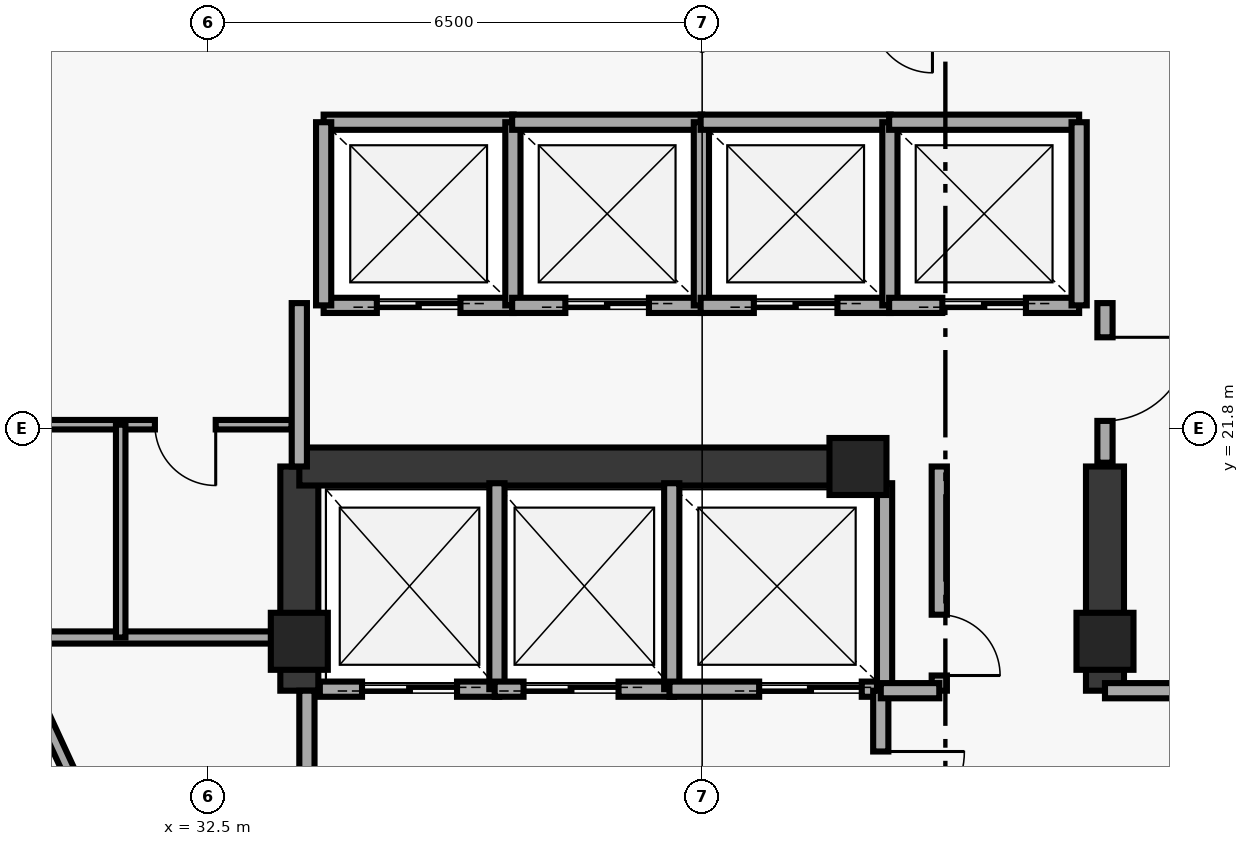
"""IFC4 building model, lengths in metres.
Left out: names, types, materials, properties, quantities, classifications, styles, units other than length and angle.
Written with IfcOpenShell. Run it as: python <this file> out.ifc"""

import sys

from ifc_helpers import new_model, si_unit, direction, frame, frame_2d, origin, origin_2d, place, context, subcontext, project, spatial, rectangle, extrude, element, fill, save


model = new_model("IFC4")
c1 = context("Model", 3, precision=1e-05, world=origin(), true_north=direction((0.0, 1.0)))
c2 = subcontext(c1, "Body", "Model", "MODEL_VIEW")
j1 = project(units=[si_unit("LENGTHUNIT", "METRE"), si_unit("PLANEANGLEUNIT", "RADIAN")], contexts=[c1])
p1 = place(None, origin())
s1 = spatial("IfcSite", under=j1, at=p1, CompositionType="ELEMENT")
p2 = place(p1, origin())
s2 = spatial("IfcBuilding", under=s1, at=p2, CompositionType="ELEMENT")
p3 = place(p2, frame((0.0, 0.0, 297.4)))
s3 = spatial("IfcBuildingStorey", under=s2, at=p3, CompositionType="ELEMENT", Elevation=297.4)
for number, where, z_axis, x_axis in (
    (1, (33.7, 19.0, 0.0), (0.0, 0.0, 1.0), (1.0, 0.0, 0.0)),
    (2, (41.05, 21.3, 0.0), (0.0, 0.0, 1.0), (1.0, 0.0, 0.0)),
    (3, (44.3, 19.0, 0.0), (0.0, 0.0, 1.0), (1.0, 0.0, 0.0)),
):
    element("IfcColumn", number, at=place(p3, frame(where, z_axis=z_axis, x_axis=x_axis)), inside=s3, PredefinedType="PILASTER", context=c2, shape_type="SweptSolid", body=[
        extrude(rectangle(XDim=0.75, YDim=0.75, at=origin_2d()), origin(), (0.0, 0.0, 1.0), 3.45),
    ])
for number, where, z_axis, x_axis in (
    (4, (33.7, 18.35, 0.0), (0.0, 0.0, 1.0), (0.0, 1.0, 0.0)),
    (5, (44.3, 18.35, 0.0), (0.0, 0.0, 1.0), (0.0, 1.0, 0.0)),
):
    element("IfcWall", number, at=place(p3, frame(where, z_axis=z_axis, x_axis=x_axis)), inside=s3, PredefinedType="SHEAR", context=c2, shape_type="SweptSolid", body=[
        extrude(rectangle(XDim=2.95, YDim=0.5, at=frame_2d((1.475, 0.0))), origin(), (0.0, 0.0, 1.0), 3.45),
    ])
p4 = place(p3, frame((33.7, 21.3, 0.0), z_axis=(0.0, 0.0, 1.0), x_axis=(1.0, 0.0, 0.0)))
e6 = element("IfcWall", 6, at=p4, inside=s3, PredefinedType="SHEAR", context=c2, shape_type="SweptSolid", body=[
    extrude(rectangle(XDim=7.55, YDim=0.5, at=frame_2d((3.775, 0.0))), origin(), (0.0, 0.0, 1.0), 3.45),
])
p5 = place(p3, frame((34.02, 23.42, 0.0), z_axis=(0.0, 0.0, 1.0), x_axis=(1.0, 0.0, 0.0)))
e7 = element("IfcWall", 7, at=p5, inside=s3, PredefinedType="SOLIDWALL", context=c2, shape_type="SweptSolid", body=[
    extrude(rectangle(XDim=2.5, YDim=0.2, at=frame_2d((1.25, 0.0))), origin(), (0.0, 0.0, 1.0), 3.45),
])
p6 = place(p5, frame((0.7, 0.0, 0.0)))
e8 = element("IfcOpeningElement", 8, at=p6, cuts=e7, PredefinedType="OPENING", context=c2, shape_type="SweptSolid", body=[
    extrude(rectangle(XDim=1.1, YDim=2.15, at=frame_2d((0.55, 1.075))), frame((0.0, 0.11, 0.0), z_axis=(0.0, -1.0, 0.0), x_axis=(1.0, 0.0, 0.0)), (0.0, 0.0, 1.0), 0.22),
])
p7 = place(p3, frame((34.02, 25.83, 0.0), z_axis=(0.0, 0.0, 1.0), x_axis=(1.0, 0.0, 0.0)))
e9 = element("IfcWall", 9, at=p7, inside=s3, PredefinedType="SOLIDWALL", context=c2, shape_type="SweptSolid", body=[
    extrude(rectangle(XDim=2.5, YDim=0.2, at=frame_2d((1.25, 0.0))), origin(), (0.0, 0.0, 1.0), 3.45),
])
for number, where, z_axis, x_axis in (
    (10, (34.02, 23.42, 0.0), (0.0, 0.0, 1.0), (0.0, 1.0, 0.0)),
    (11, (36.51, 23.42, 0.0), (0.0, 0.0, 1.0), (0.0, 1.0, 0.0)),
):
    element("IfcWall", number, at=place(p3, frame(where, z_axis=z_axis, x_axis=x_axis)), inside=s3, PredefinedType="SOLIDWALL", context=c2, shape_type="SweptSolid", body=[
        extrude(rectangle(XDim=2.41, YDim=0.2, at=frame_2d((1.205, 0.0))), origin(), (0.0, 0.0, 1.0), 3.45),
    ])
p8 = place(p3, frame((36.5, 23.42, 0.0), z_axis=(0.0, 0.0, 1.0), x_axis=(1.0, 0.0, 0.0)))
e12 = element("IfcWall", 12, at=p8, inside=s3, PredefinedType="SOLIDWALL", context=c2, shape_type="SweptSolid", body=[
    extrude(rectangle(XDim=2.5, YDim=0.2, at=frame_2d((1.25, 0.0))), origin(), (0.0, 0.0, 1.0), 3.45),
])
p9 = place(p8, frame((0.7, 0.0, 0.0)))
e13 = element("IfcOpeningElement", 13, at=p9, cuts=e12, PredefinedType="OPENING", context=c2, shape_type="SweptSolid", body=[
    extrude(rectangle(XDim=1.1, YDim=2.15, at=frame_2d((0.55, 1.075))), frame((0.0, 0.11, 0.0), z_axis=(0.0, -1.0, 0.0), x_axis=(1.0, 0.0, 0.0)), (0.0, 0.0, 1.0), 0.22),
])
p10 = place(p3, frame((36.5, 25.83, 0.0), z_axis=(0.0, 0.0, 1.0), x_axis=(1.0, 0.0, 0.0)))
e14 = element("IfcWall", 14, at=p10, inside=s3, PredefinedType="SOLIDWALL", context=c2, shape_type="SweptSolid", body=[
    extrude(rectangle(XDim=2.5, YDim=0.2, at=frame_2d((1.25, 0.0))), origin(), (0.0, 0.0, 1.0), 3.45),
])
p11 = place(p3, frame((38.99, 23.42, 0.0), z_axis=(0.0, 0.0, 1.0), x_axis=(0.0, 1.0, 0.0)))
e15 = element("IfcWall", 15, at=p11, inside=s3, PredefinedType="SOLIDWALL", context=c2, shape_type="SweptSolid", body=[
    extrude(rectangle(XDim=2.41, YDim=0.2, at=frame_2d((1.205, 0.0))), origin(), (0.0, 0.0, 1.0), 3.45),
])
p12 = place(p3, frame((38.98, 23.42, 0.0), z_axis=(0.0, 0.0, 1.0), x_axis=(1.0, 0.0, 0.0)))
e16 = element("IfcWall", 16, at=p12, inside=s3, PredefinedType="SOLIDWALL", context=c2, shape_type="SweptSolid", body=[
    extrude(rectangle(XDim=2.5, YDim=0.2, at=frame_2d((1.25, 0.0))), origin(), (0.0, 0.0, 1.0), 3.45),
])
p13 = place(p12, frame((0.7, 0.0, 0.0)))
e17 = element("IfcOpeningElement", 17, at=p13, cuts=e16, PredefinedType="OPENING", context=c2, shape_type="SweptSolid", body=[
    extrude(rectangle(XDim=1.1, YDim=2.15, at=frame_2d((0.55, 1.075))), frame((0.0, 0.11, 0.0), z_axis=(0.0, -1.0, 0.0), x_axis=(1.0, 0.0, 0.0)), (0.0, 0.0, 1.0), 0.22),
])
p14 = place(p3, frame((38.98, 25.83, 0.0), z_axis=(0.0, 0.0, 1.0), x_axis=(1.0, 0.0, 0.0)))
e18 = element("IfcWall", 18, at=p14, inside=s3, PredefinedType="SOLIDWALL", context=c2, shape_type="SweptSolid", body=[
    extrude(rectangle(XDim=2.5, YDim=0.2, at=frame_2d((1.25, 0.0))), origin(), (0.0, 0.0, 1.0), 3.45),
])
p15 = place(p3, frame((41.47, 23.42, 0.0), z_axis=(0.0, 0.0, 1.0), x_axis=(0.0, 1.0, 0.0)))
e19 = element("IfcWall", 19, at=p15, inside=s3, PredefinedType="SOLIDWALL", context=c2, shape_type="SweptSolid", body=[
    extrude(rectangle(XDim=2.41, YDim=0.2, at=frame_2d((1.205, 0.0))), origin(), (0.0, 0.0, 1.0), 3.45),
])
p16 = place(p3, frame((41.46, 23.42, 0.0), z_axis=(0.0, 0.0, 1.0), x_axis=(1.0, 0.0, 0.0)))
e20 = element("IfcWall", 20, at=p16, inside=s3, PredefinedType="SOLIDWALL", context=c2, shape_type="SweptSolid", body=[
    extrude(rectangle(XDim=2.5, YDim=0.2, at=frame_2d((1.25, 0.0))), origin(), (0.0, 0.0, 1.0), 3.45),
])
p17 = place(p16, frame((0.7, 0.0, 0.0)))
e21 = element("IfcOpeningElement", 21, at=p17, cuts=e20, PredefinedType="OPENING", context=c2, shape_type="SweptSolid", body=[
    extrude(rectangle(XDim=1.1, YDim=2.15, at=frame_2d((0.55, 1.075))), frame((0.0, 0.11, 0.0), z_axis=(0.0, -1.0, 0.0), x_axis=(1.0, 0.0, 0.0)), (0.0, 0.0, 1.0), 0.22),
])
p18 = place(p3, frame((41.46, 25.83, 0.0), z_axis=(0.0, 0.0, 1.0), x_axis=(1.0, 0.0, 0.0)))
e22 = element("IfcWall", 22, at=p18, inside=s3, PredefinedType="SOLIDWALL", context=c2, shape_type="SweptSolid", body=[
    extrude(rectangle(XDim=2.5, YDim=0.2, at=frame_2d((1.25, 0.0))), origin(), (0.0, 0.0, 1.0), 3.45),
])
p19 = place(p3, frame((43.96, 23.42, 0.0), z_axis=(0.0, 0.0, 1.0), x_axis=(0.0, 1.0, 0.0)))
e23 = element("IfcWall", 23, at=p19, inside=s3, PredefinedType="SOLIDWALL", context=c2, shape_type="SweptSolid", body=[
    extrude(rectangle(XDim=2.41, YDim=0.2, at=frame_2d((1.205, 0.0))), origin(), (0.0, 0.0, 1.0), 3.45),
])
p20 = place(p3, frame((33.97, 18.37, 0.0), z_axis=(0.0, 0.0, 1.0), x_axis=(1.0, 0.0, 0.0)))
e24 = element("IfcWall", 24, at=p20, inside=s3, PredefinedType="SOLIDWALL", context=c2, shape_type="SweptSolid", body=[
    extrude(rectangle(XDim=2.36, YDim=0.2, at=frame_2d((1.18, 0.0))), origin(), (0.0, 0.0, 1.0), 3.45),
])
p21 = place(p20, frame((0.555, 0.0, 0.0)))
e25 = element("IfcOpeningElement", 25, at=p21, cuts=e24, PredefinedType="OPENING", context=c2, shape_type="SweptSolid", body=[
    extrude(rectangle(XDim=1.25, YDim=2.2, at=frame_2d((0.625, 1.1))), frame((0.0, 0.11, 0.0), z_axis=(0.0, -1.0, 0.0), x_axis=(1.0, 0.0, 0.0)), (0.0, 0.0, 1.0), 0.22),
])
p22 = place(p3, frame((36.3, 18.37, 0.0), z_axis=(0.0, 0.0, 1.0), x_axis=(0.0, 1.0, 0.0)))
e26 = element("IfcWall", 26, at=p22, inside=s3, PredefinedType="SOLIDWALL", context=c2, shape_type="SweptSolid", body=[
    extrude(rectangle(XDim=2.71, YDim=0.2, at=frame_2d((1.355, 0.0))), origin(), (0.0, 0.0, 1.0), 3.45),
])
p23 = place(p3, frame((36.27, 18.37, 0.0), z_axis=(0.0, 0.0, 1.0), x_axis=(1.0, 0.0, 0.0)))
e27 = element("IfcWall", 27, at=p23, inside=s3, PredefinedType="SOLIDWALL", context=c2, shape_type="SweptSolid", body=[
    extrude(rectangle(XDim=2.36, YDim=0.2, at=frame_2d((1.18, 0.0))), origin(), (0.0, 0.0, 1.0), 3.45),
])
p24 = place(p23, frame((0.38, 0.0, 0.0)))
e28 = element("IfcOpeningElement", 28, at=p24, cuts=e27, PredefinedType="OPENING", context=c2, shape_type="SweptSolid", body=[
    extrude(rectangle(XDim=1.25, YDim=2.2, at=frame_2d((0.625, 1.1))), frame((0.0, 0.11, 0.0), z_axis=(0.0, -1.0, 0.0), x_axis=(1.0, 0.0, 0.0)), (0.0, 0.0, 1.0), 0.22),
])
p25 = place(p3, frame((38.6, 18.37, 0.0), z_axis=(0.0, 0.0, 1.0), x_axis=(0.0, 1.0, 0.0)))
e29 = element("IfcWall", 29, at=p25, inside=s3, PredefinedType="SOLIDWALL", context=c2, shape_type="SweptSolid", body=[
    extrude(rectangle(XDim=2.71, YDim=0.2, at=frame_2d((1.355, 0.0))), origin(), (0.0, 0.0, 1.0), 3.45),
])
p26 = place(p3, frame((38.57, 18.37, 0.0), z_axis=(0.0, 0.0, 1.0), x_axis=(1.0, 0.0, 0.0)))
e30 = element("IfcWall", 30, at=p26, inside=s3, PredefinedType="SOLIDWALL", context=c2, shape_type="SweptSolid", body=[
    extrude(rectangle(XDim=2.83, YDim=0.2, at=frame_2d((1.415, 0.0))), origin(), (0.0, 0.0, 1.0), 3.45),
])
p27 = place(p26, frame((1.18, 0.0, 0.0)))
e31 = element("IfcOpeningElement", 31, at=p27, cuts=e30, PredefinedType="OPENING", context=c2, shape_type="SweptSolid", body=[
    extrude(rectangle(XDim=1.35, YDim=2.18, at=frame_2d((0.675, 1.09))), frame((0.0, 0.11, 0.0), z_axis=(0.0, -1.0, 0.0), x_axis=(1.0, 0.0, 0.0)), (0.0, 0.0, 1.0), 0.22),
])
p28 = place(p3, frame((41.4, 18.37, 0.0), z_axis=(0.0, 0.0, 1.0), x_axis=(0.0, 1.0, 0.0)))
e32 = element("IfcWall", 32, at=p28, inside=s3, PredefinedType="SOLIDWALL", context=c2, shape_type="SweptSolid", body=[
    extrude(rectangle(XDim=2.71, YDim=0.2, at=frame_2d((1.355, 0.0))), origin(), (0.0, 0.0, 1.0), 3.45),
])
p29 = place(p3, frame((29.05, 19.05, 0.0), z_axis=(0.0, 0.0, 1.0), x_axis=(1.0, 0.0, 0.0)))
e33 = element("IfcWall", 33, at=p29, inside=s3, PredefinedType="PARTITIONING", context=c2, shape_type="SweptSolid", body=[
    extrude(rectangle(XDim=4.65, YDim=0.16, at=frame_2d((2.325, 0.0))), origin(), (0.0, 0.0, 1.0), 3.45),
])
p30 = place(p3, frame((33.6, 21.85, 0.0), z_axis=(0.0, 0.0, 1.0), x_axis=(-1.0, 0.0, 0.0)))
e34 = element("IfcWall", 34, at=p30, inside=s3, PredefinedType="PARTITIONING", context=c2, shape_type="SweptSolid", body=[
    extrude(rectangle(XDim=4.55, YDim=0.125, at=frame_2d((2.275, 0.0))), origin(), (0.0, 0.0, 1.0), 3.45),
])
p31 = place(p30, frame((3.2, 0.0, 0.0)))
e35 = element("IfcOpeningElement", 35, at=p31, cuts=e34, PredefinedType="OPENING", context=c2, shape_type="SweptSolid", body=[
    extrude(rectangle(XDim=0.8, YDim=2.05, at=frame_2d((0.4, 1.025))), frame((0.0, 0.073, 0.0), z_axis=(0.0, -1.0, 0.0), x_axis=(1.0, 0.0, 0.0)), (0.0, 0.0, 1.0), 0.145),
])
p32 = place(p30, frame((1.0, 0.0, 0.0)))
e36 = element("IfcOpeningElement", 36, at=p32, cuts=e34, PredefinedType="OPENING", context=c2, shape_type="SweptSolid", body=[
    extrude(rectangle(XDim=0.8, YDim=2.05, at=frame_2d((0.4, 1.025))), frame((0.0, 0.073, 0.0), z_axis=(0.0, -1.0, 0.0), x_axis=(1.0, 0.0, 0.0)), (0.0, 0.0, 1.0), 0.145),
])
p33 = place(p3, frame((31.35, 19.05, 0.0), z_axis=(0.0, 0.0, 1.0), x_axis=(0.0, 1.0, 0.0)))
e37 = element("IfcWall", 37, at=p33, inside=s3, PredefinedType="PARTITIONING", context=c2, shape_type="SweptSolid", body=[
    extrude(rectangle(XDim=2.8, YDim=0.125, at=frame_2d((1.4, 0.0))), origin(), (0.0, 0.0, 1.0), 3.45),
])
p34 = place(p3, frame((33.7, 21.3, 0.0), z_axis=(0.0, 0.0, 1.0), x_axis=(0.0, 1.0, 0.0)))
e38 = element("IfcWall", 38, at=p34, inside=s3, PredefinedType="SOLIDWALL", context=c2, shape_type="SweptSolid", body=[
    extrude(rectangle(XDim=2.15, YDim=0.2, at=frame_2d((1.075, 0.0))), origin(), (0.0, 0.0, 1.0), 2.835),
])
p35 = place(p3, frame((44.3, 21.35, 0.0), z_axis=(0.0, 0.0, 1.0), x_axis=(0.0, 1.0, 0.0)))
e39 = element("IfcWall", 39, at=p35, inside=s3, PredefinedType="SOLIDWALL", context=c2, shape_type="SweptSolid", body=[
    extrude(rectangle(XDim=2.1, YDim=0.2, at=frame_2d((1.05, 0.0))), origin(), (0.0, 0.0, 1.0), 2.835),
])
p36 = place(p35, frame((0.55, 0.0, 0.0)))
e40 = element("IfcOpeningElement", 40, at=p36, cuts=e39, PredefinedType="OPENING", context=c2, shape_type="SweptSolid", body=[
    extrude(rectangle(XDim=1.1, YDim=2.15, at=frame_2d((0.55, 1.075))), frame((0.0, 0.11, 0.0), z_axis=(0.0, -1.0, 0.0), x_axis=(1.0, 0.0, 0.0)), (0.0, 0.0, 1.0), 0.22),
])
p37 = place(p3, frame((33.8, 15.55, 0.0), z_axis=(0.0, 0.0, 1.0), x_axis=(0.0, 1.0, 0.0)))
e41 = element("IfcWall", 41, at=p37, inside=s3, PredefinedType="SOLIDWALL", context=c2, shape_type="SweptSolid", body=[
    extrude(rectangle(XDim=2.8, YDim=0.2, at=frame_2d((1.4, 0.0))), origin(), (0.0, 0.0, 1.0), 3.45),
])
p38 = place(p3, frame((41.35, 15.55, 0.0), z_axis=(0.0, 0.0, 1.0), x_axis=(0.0, 1.0, 0.0)))
e42 = element("IfcWall", 42, at=p38, inside=s3, PredefinedType="SOLIDWALL", context=c2, shape_type="SweptSolid", body=[
    extrude(rectangle(XDim=2.8, YDim=0.2, at=frame_2d((1.4, 0.0))), origin(), (0.0, 0.0, 1.0), 3.45),
])
p39 = place(p38, frame((0.9, 0.0, 0.0)))
e43 = element("IfcOpeningElement", 43, at=p39, cuts=e42, PredefinedType="OPENING", context=c2, shape_type="SweptSolid", body=[
    extrude(rectangle(XDim=1.1, YDim=2.15, at=frame_2d((0.55, 1.075))), frame((0.0, 0.11, 0.0), z_axis=(0.0, -1.0, 0.0), x_axis=(1.0, 0.0, 0.0)), (0.0, 0.0, 1.0), 0.22),
])
p40 = place(p3, frame((44.3, 18.35, 0.0), z_axis=(0.0, 0.0, 1.0), x_axis=(1.0, 0.0, 0.0)))
e44 = element("IfcWall", 44, at=p40, inside=s3, PredefinedType="SOLIDWALL", context=c2, shape_type="SweptSolid", body=[
    extrude(rectangle(XDim=1.55, YDim=0.2, at=frame_2d((0.775, 0.0))), origin(), (0.0, 0.0, 1.0), 3.45),
])
p41 = place(p3, frame((42.12, 18.35, 0.0), z_axis=(0.0, 0.0, 1.0), x_axis=(0.0, 1.0, 0.0)))
e45 = element("IfcWall", 45, at=p41, inside=s3, PredefinedType="SOLIDWALL", context=c2, shape_type="SweptSolid", body=[
    extrude(rectangle(XDim=2.95, YDim=0.2, at=frame_2d((1.475, 0.0))), origin(), (0.0, 0.0, 1.0), 3.45),
])
p42 = place(p41, frame((0.2, 0.0, 0.0)))
e46 = element("IfcOpeningElement", 46, at=p42, cuts=e45, PredefinedType="OPENING", context=c2, shape_type="SweptSolid", body=[
    extrude(rectangle(XDim=0.8, YDim=2.05, at=frame_2d((0.4, 1.025))), frame((0.0, 0.11, 0.0), z_axis=(0.0, -1.0, 0.0), x_axis=(1.0, 0.0, 0.0)), (0.0, 0.0, 1.0), 0.22),
])
p43 = place(p3, frame((41.35, 18.35, 0.0), z_axis=(0.0, 0.0, 1.0), x_axis=(1.0, 0.0, 0.0)))
e47 = element("IfcWall", 47, at=p43, inside=s3, PredefinedType="SOLIDWALL", context=c2, shape_type="SweptSolid", body=[
    extrude(rectangle(XDim=0.77, YDim=0.2, at=frame_2d((0.385, 0.0))), origin(), (0.0, 0.0, 1.0), 3.45),
])
p44 = place(p3, frame((27.988, 23.104, 0.0), z_axis=(0.0, 0.0, 1.0), x_axis=(0.418656179426, -0.908144814128, 0.0)))
e48 = element("IfcWall", 48, at=p44, inside=s3, PredefinedType="PARTITIONING", context=c2, shape_type="SweptSolid", body=[
    extrude(rectangle(XDim=7.049, YDim=0.16, at=frame_2d((3.524, 0.0))), origin(), (0.0, 0.0, 1.0), 3.45),
])
p45 = place(p6, origin())
e49 = element("IfcDoor", 49, at=p45, inside=s3, OperationType="DOUBLE_DOOR_SLIDING", PredefinedType="DOOR", context=c2, shape_type="SweptSolid", body=[
    extrude(rectangle(XDim=1.1, YDim=2.15, at=frame_2d((0.55, 1.075))), frame((0.0, 0.025, 0.0), z_axis=(0.0, -1.0, 0.0), x_axis=(1.0, 0.0, 0.0)), (0.0, 0.0, 1.0), 0.05),
])
fill(e8, e49)
p46 = place(p9, origin())
e50 = element("IfcDoor", 50, at=p46, inside=s3, OperationType="DOUBLE_DOOR_SLIDING", PredefinedType="DOOR", context=c2, shape_type="SweptSolid", body=[
    extrude(rectangle(XDim=1.1, YDim=2.15, at=frame_2d((0.55, 1.075))), frame((0.0, 0.025, 0.0), z_axis=(0.0, -1.0, 0.0), x_axis=(1.0, 0.0, 0.0)), (0.0, 0.0, 1.0), 0.05),
])
fill(e13, e50)
p47 = place(p13, origin())
e51 = element("IfcDoor", 51, at=p47, inside=s3, OperationType="DOUBLE_DOOR_SLIDING", PredefinedType="DOOR", context=c2, shape_type="SweptSolid", body=[
    extrude(rectangle(XDim=1.1, YDim=2.15, at=frame_2d((0.55, 1.075))), frame((0.0, 0.025, 0.0), z_axis=(0.0, -1.0, 0.0), x_axis=(1.0, 0.0, 0.0)), (0.0, 0.0, 1.0), 0.05),
])
fill(e17, e51)
p48 = place(p17, origin())
e52 = element("IfcDoor", 52, at=p48, inside=s3, OperationType="DOUBLE_DOOR_SLIDING", PredefinedType="DOOR", context=c2, shape_type="SweptSolid", body=[
    extrude(rectangle(XDim=1.1, YDim=2.15, at=frame_2d((0.55, 1.075))), frame((0.0, 0.025, 0.0), z_axis=(0.0, -1.0, 0.0), x_axis=(1.0, 0.0, 0.0)), (0.0, 0.0, 1.0), 0.05),
])
fill(e21, e52)
p49 = place(p21, origin())
e53 = element("IfcDoor", 53, at=p49, inside=s3, OperationType="DOUBLE_DOOR_SLIDING", PredefinedType="DOOR", context=c2, shape_type="SweptSolid", body=[
    extrude(rectangle(XDim=1.25, YDim=2.2, at=frame_2d((0.625, 1.1))), frame((0.0, 0.025, 0.0), z_axis=(0.0, -1.0, 0.0), x_axis=(1.0, 0.0, 0.0)), (0.0, 0.0, 1.0), 0.05),
])
fill(e25, e53)
p50 = place(p24, origin())
e54 = element("IfcDoor", 54, at=p50, inside=s3, OperationType="DOUBLE_DOOR_SLIDING", PredefinedType="DOOR", context=c2, shape_type="SweptSolid", body=[
    extrude(rectangle(XDim=1.25, YDim=2.2, at=frame_2d((0.625, 1.1))), frame((0.0, 0.025, 0.0), z_axis=(0.0, -1.0, 0.0), x_axis=(1.0, 0.0, 0.0)), (0.0, 0.0, 1.0), 0.05),
])
fill(e28, e54)
p51 = place(p27, origin())
e55 = element("IfcDoor", 55, at=p51, inside=s3, OperationType="DOUBLE_DOOR_SLIDING", PredefinedType="DOOR", context=c2, shape_type="SweptSolid", body=[
    extrude(rectangle(XDim=1.35, YDim=2.18, at=frame_2d((0.675, 1.09))), frame((0.0, 0.025, 0.0), z_axis=(0.0, -1.0, 0.0), x_axis=(1.0, 0.0, 0.0)), (0.0, 0.0, 1.0), 0.05),
])
fill(e31, e55)
p52 = place(p32, origin())
e56 = element("IfcDoor", 56, at=p52, inside=s3, OperationType="SINGLE_SWING_LEFT", PredefinedType="DOOR", context=c2, shape_type="SweptSolid", body=[
    extrude(rectangle(XDim=0.8, YDim=2.05, at=frame_2d((0.4, 1.025))), frame((0.0, 0.025, 0.0), z_axis=(0.0, -1.0, 0.0), x_axis=(1.0, 0.0, 0.0)), (0.0, 0.0, 1.0), 0.05),
])
fill(e36, e56)
p53 = place(p36, origin())
e57 = element("IfcDoor", 57, at=p53, inside=s3, OperationType="SINGLE_SWING_RIGHT", PredefinedType="DOOR", context=c2, shape_type="SweptSolid", body=[
    extrude(rectangle(XDim=1.1, YDim=2.15, at=frame_2d((0.55, 1.075))), frame((0.0, 0.025, 0.0), z_axis=(0.0, -1.0, 0.0), x_axis=(1.0, 0.0, 0.0)), (0.0, 0.0, 1.0), 0.05),
])
fill(e40, e57)
p54 = place(p39, origin())
e58 = element("IfcDoor", 58, at=p54, inside=s3, OperationType="SINGLE_SWING_RIGHT", PredefinedType="DOOR", context=c2, shape_type="SweptSolid", body=[
    extrude(rectangle(XDim=1.1, YDim=2.15, at=frame_2d((0.55, 1.075))), frame((0.0, 0.025, 0.0), z_axis=(0.0, -1.0, 0.0), x_axis=(1.0, 0.0, 0.0)), (0.0, 0.0, 1.0), 0.05),
])
fill(e43, e58)
p55 = place(p42, origin())
e59 = element("IfcDoor", 59, at=p55, inside=s3, OperationType="SINGLE_SWING_LEFT", PredefinedType="DOOR", context=c2, shape_type="SweptSolid", body=[
    extrude(rectangle(XDim=0.8, YDim=2.05, at=frame_2d((0.4, 1.025))), frame((0.0, 0.025, 0.0), z_axis=(0.0, -1.0, 0.0), x_axis=(1.0, 0.0, 0.0)), (0.0, 0.0, 1.0), 0.05),
])
fill(e46, e59)
save(model, sys.argv[1])
